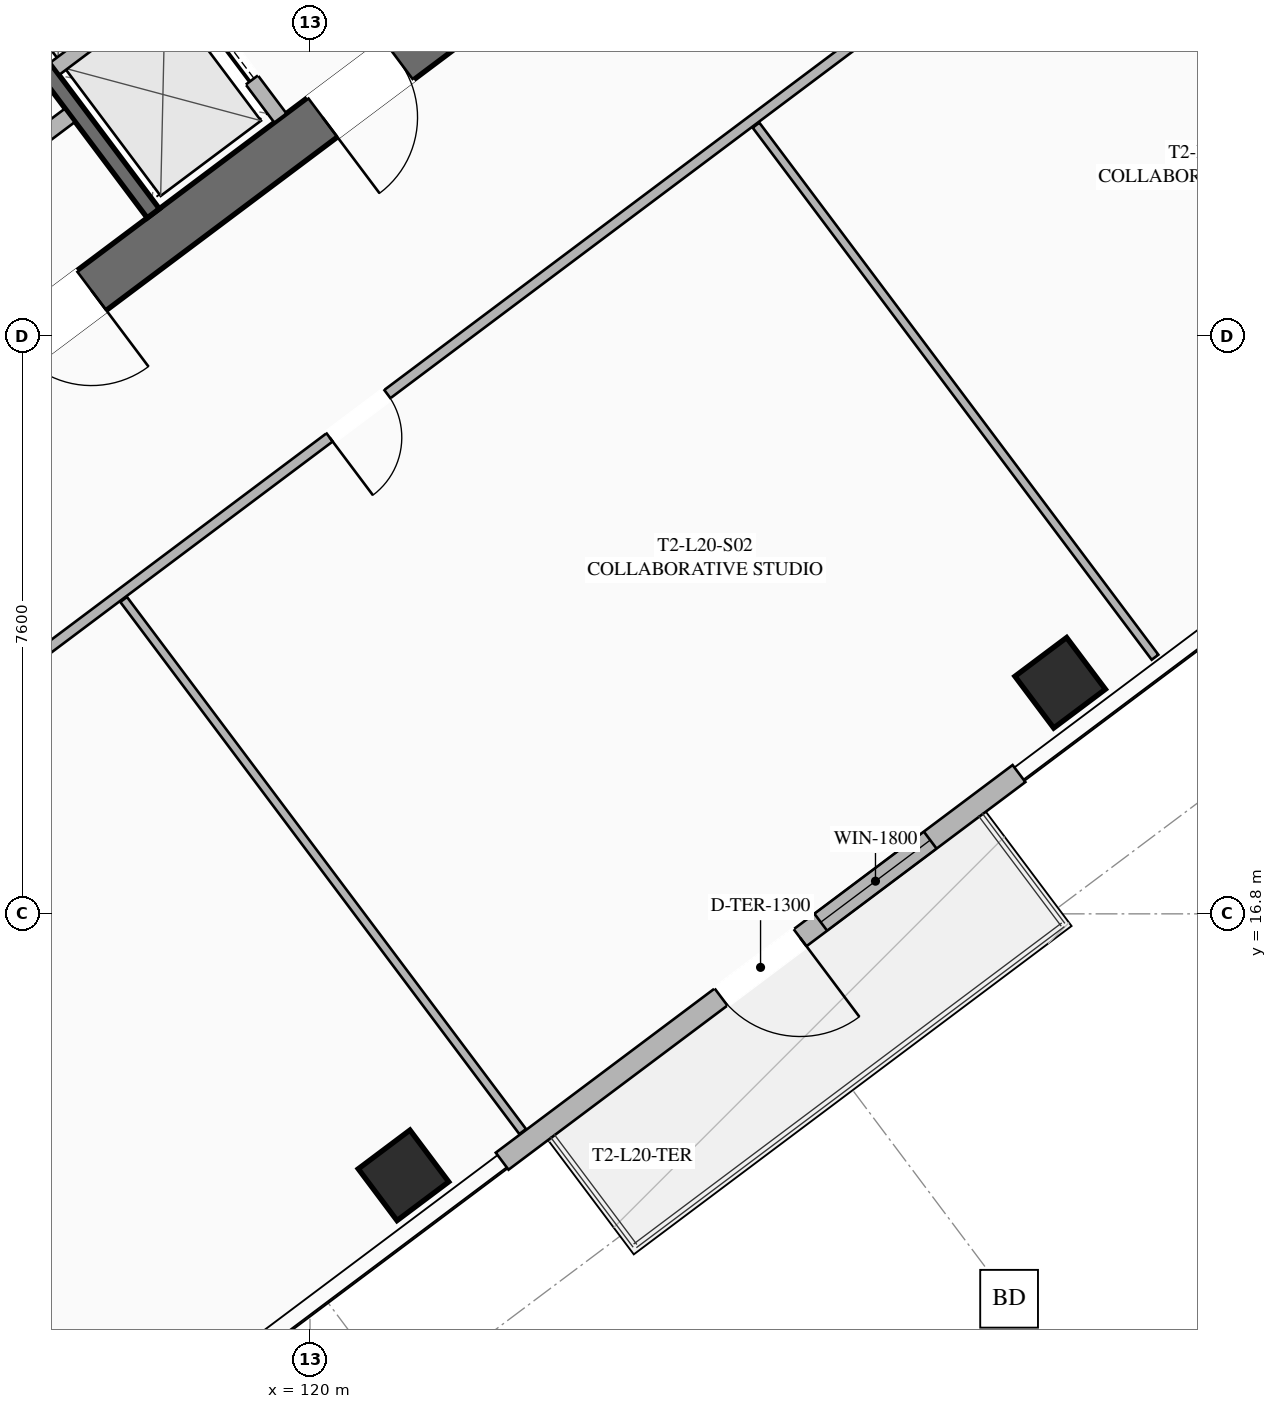
"""IFC4 building model, lengths in metres.
Left out: names, types, materials, properties, quantities, classifications, styles, units other than length and angle.
Written with IfcOpenShell. Run it as: python <this file> out.ifc"""

import sys

from ifc_helpers import new_model, si_unit, direction, frame, frame_2d, origin, origin_2d, place, context, subcontext, project, spatial, rectangle, hollow_rectangle, extrude, element, fill, save


model = new_model("IFC4")
c1 = context("Model", 3, precision=1e-05, world=origin(), true_north=direction((0.0, 1.0)))
c2 = subcontext(c1, "Body", "Model", "MODEL_VIEW")
j1 = project(units=[si_unit("LENGTHUNIT", "METRE"), si_unit("PLANEANGLEUNIT", "RADIAN")], contexts=[c1])
p1 = place(None, origin())
s1 = spatial("IfcSite", under=j1, at=p1, CompositionType="ELEMENT")
p2 = place(p1, origin())
s2 = spatial("IfcBuilding", under=s1, at=p2, CompositionType="ELEMENT")
p3 = place(p2, frame((0.0, 0.0, 77.85)))
s3 = spatial("IfcBuildingStorey", under=s2, at=p3, CompositionType="ELEMENT", Elevation=77.85)
p4 = place(p3, frame((124.429, 30.478, 0.0), z_axis=(0.0, 0.0, 1.0), x_axis=(-0.799998028465, -0.600002628705, 0.0)))
e1 = element("IfcWall", 1, at=p4, inside=s3, PredefinedType="SHEAR", context=c2, shape_type="SweptSolid", body=[
    extrude(rectangle(XDim=14.86, YDim=0.65, at=frame_2d((7.43, 0.0))), origin(), (0.0, 0.0, 1.0), 3.55),
])
p5 = place(p4, frame((9.13, 0.0, 0.0)))
e2 = element("IfcOpeningElement", 2, at=p5, cuts=e1, PredefinedType="OPENING", context=c2, shape_type="SweptSolid", body=[
    extrude(rectangle(XDim=1.25, YDim=2.25, at=frame_2d((0.625, 1.125))), frame((0.0, 0.335, 0.0), z_axis=(0.0, -1.0, 0.0), x_axis=(1.0, 0.0, 0.0)), (0.0, 0.0, 1.0), 0.67),
])
p6 = place(p4, frame((4.08, 0.0, 0.0)))
e3 = element("IfcOpeningElement", 3, at=p6, cuts=e1, PredefinedType="OPENING", context=c2, shape_type="SweptSolid", body=[
    extrude(rectangle(XDim=1.25, YDim=2.25, at=frame_2d((0.625, 1.125))), frame((0.0, 0.335, 0.0), z_axis=(0.0, -1.0, 0.0), x_axis=(1.0, 0.0, 0.0)), (0.0, 0.0, 1.0), 0.67),
])
for number, where, z_axis, x_axis in (
    (4, (121.23, 13.36, 0.0), (0.0, 0.0, 1.0), (0.8, 0.6, 0.0)),
    (5, (129.87, 19.84, 0.0), (0.0, 0.0, 1.0), (0.8, 0.6, 0.0)),
):
    element("IfcColumn", number, at=place(p3, frame(where, z_axis=z_axis, x_axis=x_axis)), inside=s3, PredefinedType="COLUMN", context=c2, shape_type="SweptSolid", body=[
        extrude(hollow_rectangle(XDim=0.85, YDim=0.85, WallThickness=0.035, at=origin_2d()), origin(), (0.0, 0.0, 1.0), 3.35),
    ])
p7 = place(p3, frame((129.328, 18.646, 0.0), z_axis=(0.0, 0.0, 1.0), x_axis=(-0.799986212866, -0.600018382406, 0.0)))
e6 = element("IfcWall", 6, at=p7, inside=s3, PredefinedType="SOLIDWALL", context=c2, shape_type="SweptSolid", body=[
    extrude(rectangle(XDim=8.5, YDim=0.28, at=frame_2d((4.25, 0.0))), origin(), (0.0, 0.0, 1.0), 3.35),
])
p8 = place(p7, frame((3.6, 0.0, 0.0)))
e7 = element("IfcOpeningElement", 7, at=p8, cuts=e6, PredefinedType="OPENING", context=c2, shape_type="SweptSolid", body=[
    extrude(rectangle(XDim=1.3, YDim=2.15, at=frame_2d((0.65, 1.075))), frame((0.0, 0.15, 0.0), z_axis=(0.0, -1.0, 0.0), x_axis=(1.0, 0.0, 0.0)), (0.0, 0.0, 1.0), 0.3),
])
p9 = place(p7, frame((1.46, 0.0, 0.85)))
e8 = element("IfcOpeningElement", 8, at=p9, cuts=e6, PredefinedType="OPENING", context=c2, shape_type="SweptSolid", body=[
    extrude(rectangle(XDim=1.8, YDim=1.92, at=frame_2d((0.9, 0.96))), frame((0.0, 0.15, 0.0), z_axis=(0.0, -1.0, 0.0), x_axis=(1.0, 0.0, 0.0)), (0.0, 0.0, 1.0), 0.3),
])
p10 = place(p3, frame((117.938, 26.016, 0.0), z_axis=(0.0, 0.0, 1.0), x_axis=(-0.600005463273, 0.799995902516, 0.0)))
e9 = element("IfcWall", 9, at=p10, inside=s3, PredefinedType="SHEAR", context=c2, shape_type="SweptSolid", body=[
    extrude(rectangle(XDim=14.3, YDim=0.2, at=frame_2d((7.15, 0.0))), origin(), (0.0, 0.0, 1.0), 3.35),
])
p11 = place(p3, frame((114.316, 25.412, 0.0), z_axis=(0.0, 0.0, 1.0), x_axis=(0.800018601094, 0.59997519774, 0.0)))
e10 = element("IfcWall", 10, at=p11, inside=s3, PredefinedType="SOLIDWALL", context=c2, shape_type="SweptSolid", body=[
    extrude(rectangle(XDim=3.15, YDim=0.22, at=frame_2d((1.575, 0.0))), origin(), (0.0, 0.0, 1.0), 2.703),
])
p12 = place(p11, frame((0.95, 0.0, 0.0)))
e11 = element("IfcOpeningElement", 11, at=p12, cuts=e10, PredefinedType="OPENING", context=c2, shape_type="SweptSolid", body=[
    extrude(rectangle(XDim=1.25, YDim=2.25, at=frame_2d((0.625, 1.125))), frame((0.0, 0.12, 0.0), z_axis=(0.0, -1.0, 0.0), x_axis=(1.0, 0.0, 0.0)), (0.0, 0.0, 1.0), 0.24),
])
p13 = place(p3, frame((119.61, 27.27, 0.0), z_axis=(0.0, 0.0, 1.0), x_axis=(-0.600011488909, 0.79999138319, 0.0)))
e12 = element("IfcWall", 12, at=p13, inside=s3, PredefinedType="SOLIDWALL", context=c2, shape_type="SweptSolid", body=[
    extrude(rectangle(XDim=6.8, YDim=0.2, at=frame_2d((3.4, 0.0))), origin(), (0.0, 0.0, 1.0), 3.35),
])
p14 = place(p13, frame((0.625, 0.0, 0.0)))
e13 = element("IfcOpeningElement", 13, at=p14, cuts=e12, PredefinedType="OPENING", context=c2, shape_type="SweptSolid", body=[
    extrude(rectangle(XDim=1.1, YDim=2.2, at=frame_2d((0.55, 1.1))), frame((0.0, 0.11, 0.0), z_axis=(0.0, -1.0, 0.0), x_axis=(1.0, 0.0, 0.0)), (0.0, 0.0, 1.0), 0.22),
])
p15 = place(p13, frame((2.875, 0.0, 0.0)))
e14 = element("IfcOpeningElement", 14, at=p15, cuts=e12, PredefinedType="OPENING", context=c2, shape_type="SweptSolid", body=[
    extrude(rectangle(XDim=1.1, YDim=2.2, at=frame_2d((0.55, 1.1))), frame((0.0, 0.11, 0.0), z_axis=(0.0, -1.0, 0.0), x_axis=(1.0, 0.0, 0.0)), (0.0, 0.0, 1.0), 0.22),
])
p16 = place(p13, frame((5.125, 0.0, 0.0)))
e15 = element("IfcOpeningElement", 15, at=p16, cuts=e12, PredefinedType="OPENING", context=c2, shape_type="SweptSolid", body=[
    extrude(rectangle(XDim=1.1, YDim=2.2, at=frame_2d((0.55, 1.1))), frame((0.0, 0.11, 0.0), z_axis=(0.0, -1.0, 0.0), x_axis=(1.0, 0.0, 0.0)), (0.0, 0.0, 1.0), 0.22),
])
p17 = place(p3, frame((116.646, 27.922, 0.0), z_axis=(0.0, 0.0, 1.0), x_axis=(0.8, 0.6, 0.0)))
e16 = element("IfcWall", 16, at=p17, inside=s3, PredefinedType="SOLIDWALL", context=c2, shape_type="SweptSolid", body=[
    extrude(rectangle(XDim=1.88, YDim=0.2, at=frame_2d((0.94, 0.0))), origin(), (0.0, 0.0, 1.0), 3.35),
])
p18 = place(p3, frame((134.18, 33.51, 0.0), z_axis=(0.0, 0.0, 1.0), x_axis=(-0.8, -0.6, 0.0)))
e17 = element("IfcWall", 17, at=p18, inside=s3, PredefinedType="PARTITIONING", context=c2, shape_type="SweptSolid", body=[
    extrude(rectangle(XDim=28.23, YDim=0.135, at=frame_2d((14.115, 0.0))), origin(), (0.0, 0.0, 1.0), 2.703),
])
p19 = place(p18, frame((26.9, 0.0, 0.0)))
e18 = element("IfcOpeningElement", 18, at=p19, cuts=e17, PredefinedType="OPENING", context=c2, shape_type="SweptSolid", body=[
    extrude(rectangle(XDim=0.95, YDim=2.05, at=frame_2d((0.475, 1.025))), frame((0.0, 0.077, 0.0), z_axis=(0.0, -1.0, 0.0), x_axis=(1.0, 0.0, 0.0)), (0.0, 0.0, 1.0), 0.155),
])
p20 = place(p18, frame((16.453, 0.0, 0.0)))
e19 = element("IfcOpeningElement", 19, at=p20, cuts=e17, PredefinedType="OPENING", context=c2, shape_type="SweptSolid", body=[
    extrude(rectangle(XDim=0.95, YDim=2.05, at=frame_2d((0.475, 1.025))), frame((0.0, 0.077, 0.0), z_axis=(0.0, -1.0, 0.0), x_axis=(1.0, 0.0, 0.0)), (0.0, 0.0, 1.0), 0.155),
])
p21 = place(p18, frame((0.38, 0.0, 0.0)))
e20 = element("IfcOpeningElement", 20, at=p21, cuts=e17, PredefinedType="OPENING", context=c2, shape_type="SweptSolid", body=[
    extrude(rectangle(XDim=0.95, YDim=2.05, at=frame_2d((0.475, 1.025))), frame((0.0, 0.077, 0.0), z_axis=(0.0, -1.0, 0.0), x_axis=(1.0, 0.0, 0.0)), (0.0, 0.0, 1.0), 0.155),
])
for number, where, z_axis, x_axis in (
    (21, (122.798, 13.936, 0.0), (0.0, 0.0, 1.0), (-0.6, 0.8, 0.0)),
    (22, (131.118, 20.176, 0.0), (0.0, 0.0, 1.0), (-0.6, 0.8, 0.0)),
):
    element("IfcWall", number, at=place(p3, frame(where, z_axis=z_axis, x_axis=x_axis)), inside=s3, PredefinedType="PARTITIONING", context=c2, shape_type="SweptSolid", body=[
        extrude(rectangle(XDim=8.75, YDim=0.11, at=frame_2d((4.375, 0.0))), origin(), (0.0, 0.0, 1.0), 2.703),
    ])
p22 = place(p8, origin())
e23 = element("IfcDoor", 23, at=p22, inside=s3, OperationType="SINGLE_SWING_LEFT", PredefinedType="DOOR", context=c2, shape_type="SweptSolid", body=[
    extrude(rectangle(XDim=1.3, YDim=2.15, at=frame_2d((0.65, 1.075))), frame((0.0, 0.025, 0.0), z_axis=(0.0, -1.0, 0.0), x_axis=(1.0, 0.0, 0.0)), (0.0, 0.0, 1.0), 0.05),
])
fill(e7, e23)
p23 = place(p9, origin())
e24 = element("IfcWindow", 24, at=p23, inside=s3, PartitioningType="SINGLE_PANEL", PredefinedType="WINDOW", context=c2, shape_type="SweptSolid", body=[
    extrude(rectangle(XDim=1.8, YDim=1.92, at=frame_2d((0.9, 0.96))), frame((0.0, 0.03, 0.0), z_axis=(0.0, -1.0, 0.0), x_axis=(1.0, 0.0, 0.0)), (0.0, 0.0, 1.0), 0.06),
])
fill(e8, e24)
p24 = place(p5, origin())
e25 = element("IfcDoor", 25, at=p24, inside=s3, OperationType="SINGLE_SWING_LEFT", PredefinedType="DOOR", context=c2, shape_type="SweptSolid", body=[
    extrude(rectangle(XDim=1.25, YDim=2.25, at=frame_2d((0.625, 1.125))), frame((0.0, 0.025, 0.0), z_axis=(0.0, -1.0, 0.0), x_axis=(1.0, 0.0, 0.0)), (0.0, 0.0, 1.0), 0.05),
])
fill(e2, e25)
p25 = place(p6, origin())
e26 = element("IfcDoor", 26, at=p25, inside=s3, OperationType="SINGLE_SWING_RIGHT", PredefinedType="DOOR", context=c2, shape_type="SweptSolid", body=[
    extrude(rectangle(XDim=1.25, YDim=2.25, at=frame_2d((0.625, 1.125))), frame((0.0, 0.025, 0.0), z_axis=(0.0, -1.0, 0.0), x_axis=(1.0, 0.0, 0.0)), (0.0, 0.0, 1.0), 0.05),
])
fill(e3, e26)
p26 = place(p20, origin())
e27 = element("IfcDoor", 27, at=p26, inside=s3, OperationType="SINGLE_SWING_RIGHT", PredefinedType="DOOR", context=c2, shape_type="SweptSolid", body=[
    extrude(rectangle(XDim=0.95, YDim=2.05, at=frame_2d((0.475, 1.025))), frame((0.0, 0.025, 0.0), z_axis=(0.0, -1.0, 0.0), x_axis=(1.0, 0.0, 0.0)), (0.0, 0.0, 1.0), 0.05),
])
fill(e19, e27)
p27 = place(p14, origin())
e28 = element("IfcDoor", 28, at=p27, inside=s3, OperationType="SLIDING_TO_LEFT", PredefinedType="DOOR", context=c2, shape_type="SweptSolid", body=[
    extrude(rectangle(XDim=1.1, YDim=2.2, at=frame_2d((0.55, 1.1))), frame((0.0, 0.025, 0.0), z_axis=(0.0, -1.0, 0.0), x_axis=(1.0, 0.0, 0.0)), (0.0, 0.0, 1.0), 0.05),
])
fill(e13, e28)
save(model, sys.argv[1])
